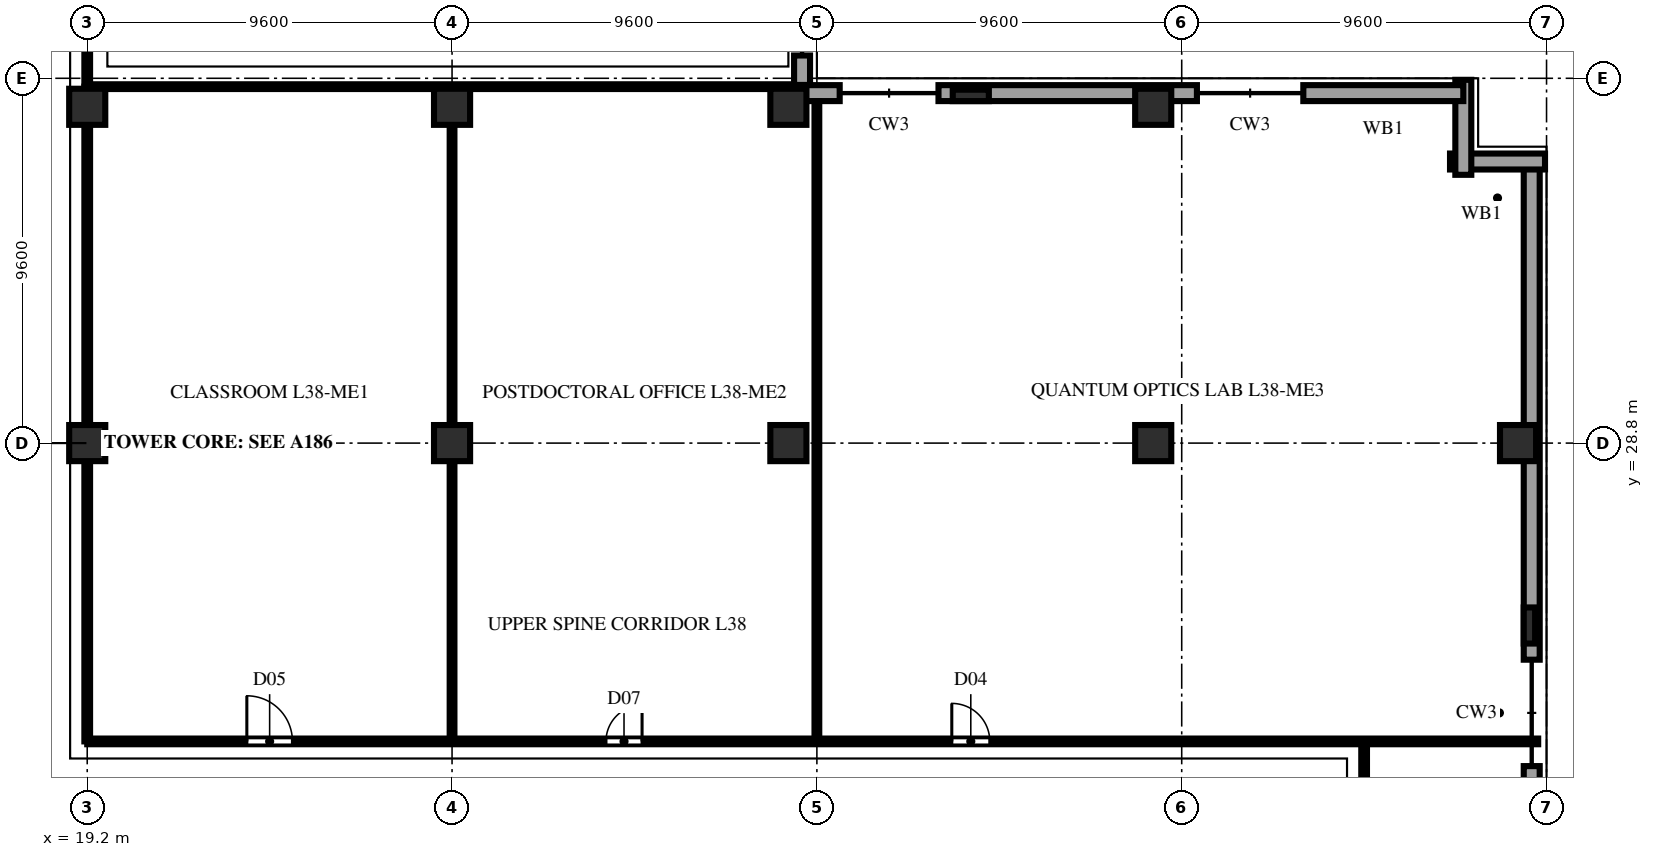
"""IFC4 building model, lengths in metres.
Left out: names, types, materials, properties, quantities, classifications, styles, units other than length and angle.
Written with IfcOpenShell. Run it as: python <this file> out.ifc"""

import sys

from ifc_helpers import new_model, si_unit, direction, frame, frame_2d, origin, origin_2d, place, context, subcontext, project, spatial, rectangle, extrude, element, fill, save


model = new_model("IFC4")
c1 = context("Model", 3, precision=1e-05, world=origin(), true_north=direction((0.0, 1.0)))
c2 = subcontext(c1, "Body", "Model", "MODEL_VIEW")
j1 = project(units=[si_unit("LENGTHUNIT", "METRE"), si_unit("PLANEANGLEUNIT", "RADIAN")], contexts=[c1])
p1 = place(None, origin())
s1 = spatial("IfcSite", under=j1, at=p1, CompositionType="ELEMENT")
p2 = place(p1, origin())
s2 = spatial("IfcBuilding", under=s1, at=p2, CompositionType="ELEMENT")
p3 = place(p2, frame((0.0, 0.0, 150.8)))
s3 = spatial("IfcBuildingStorey", under=s2, at=p3, CompositionType="ELEMENT", Elevation=150.8)
for number, where, z_axis, x_axis in (
    (1, (19.2, 28.8, 0.0), (0.0, 0.0, 1.0), (1.0, 0.0, 0.0)),
    (2, (19.2, 37.65, 0.0), (0.0, 0.0, 1.0), (1.0, 0.0, 0.0)),
    (3, (28.8, 28.8, 0.0), (0.0, 0.0, 1.0), (1.0, 0.0, 0.0)),
    (4, (28.8, 37.65, 0.0), (0.0, 0.0, 1.0), (1.0, 0.0, 0.0)),
    (5, (37.65, 28.8, 0.0), (0.0, 0.0, 1.0), (1.0, 0.0, 0.0)),
    (6, (37.65, 37.65, 0.0), (0.0, 0.0, 1.0), (1.0, 0.0, 0.0)),
    (7, (47.25, 28.8, 0.0), (0.0, 0.0, 1.0), (1.0, 0.0, 0.0)),
    (8, (47.25, 37.65, 0.0), (0.0, 0.0, 1.0), (1.0, 0.0, 0.0)),
    (9, (56.85, 28.8, 0.0), (0.0, 0.0, 1.0), (1.0, 0.0, 0.0)),
):
    element("IfcColumn", number, at=place(p3, frame(where, z_axis=z_axis, x_axis=x_axis)), inside=s3, PredefinedType="COLUMN", context=c2, shape_type="SweptSolid", body=[
        extrude(rectangle(XDim=0.95, YDim=0.95, at=origin_2d()), origin(), (0.0, 0.0, 1.0), 5.2),
    ])
for number, where, z_axis, x_axis in (
    (10, (57.15, 24.0, 0.0), (0.0, 0.0, 1.0), (0.0, 1.0, 0.0)),
    (11, (42.45, 37.95, 0.0), (0.0, 0.0, 1.0), (1.0, 0.0, 0.0)),
):
    element("IfcColumn", number, at=place(p3, frame(where, z_axis=z_axis, x_axis=x_axis)), inside=s3, PredefinedType="PILASTER", context=c2, shape_type="SweptSolid", body=[
        extrude(rectangle(XDim=0.95, YDim=0.3, at=origin_2d()), origin(), (0.0, 0.0, 1.0), 5.2),
    ])
p4 = place(p3, frame((57.21, 13.5, 0.0), z_axis=(0.0, 0.0, 1.0), x_axis=(0.0, 1.0, 0.0)))
e12 = element("IfcWall", 12, at=p4, inside=s3, PredefinedType="SOLIDWALL", context=c2, shape_type="SweptSolid", body=[
    extrude(rectangle(XDim=6.8, YDim=0.42, at=frame_2d((3.4, 0.0))), origin(), (0.0, 0.0, 1.0), 4.94),
])
p5 = place(p3, frame((57.21, 23.1, 0.0), z_axis=(0.0, 0.0, 1.0), x_axis=(0.0, 1.0, 0.0)))
e13 = element("IfcWall", 13, at=p5, inside=s3, PredefinedType="SOLIDWALL", context=c2, shape_type="SweptSolid", body=[
    extrude(rectangle(XDim=13.11, YDim=0.42, at=frame_2d((6.555, 0.0))), origin(), (0.0, 0.0, 1.0), 4.94),
])
for number, where, z_axis, x_axis in (
    (14, (57.56, 36.21, 0.0), (0.0, 0.0, 1.0), (-1.0, 0.0, 0.0)),
    (15, (55.41, 35.86, 0.0), (0.0, 0.0, 1.0), (0.0, 1.0, 0.0)),
):
    element("IfcWall", number, at=place(p3, frame(where, z_axis=z_axis, x_axis=x_axis)), inside=s3, PredefinedType="SOLIDWALL", context=c2, shape_type="SweptSolid", body=[
        extrude(rectangle(XDim=2.5, YDim=0.42, at=frame_2d((1.25, 0.0))), origin(), (0.0, 0.0, 1.0), 4.94),
    ])
p6 = place(p3, frame((55.41, 38.01, 0.0), z_axis=(0.0, 0.0, 1.0), x_axis=(-1.0, 0.0, 0.0)))
e16 = element("IfcWall", 16, at=p6, inside=s3, PredefinedType="SOLIDWALL", context=c2, shape_type="SweptSolid", body=[
    extrude(rectangle(XDim=4.21, YDim=0.42, at=frame_2d((2.105, 0.0))), origin(), (0.0, 0.0, 1.0), 4.94),
])
p7 = place(p3, frame((48.4, 38.01, 0.0), z_axis=(0.0, 0.0, 1.0), x_axis=(-1.0, 0.0, 0.0)))
e17 = element("IfcWall", 17, at=p7, inside=s3, PredefinedType="SOLIDWALL", context=c2, shape_type="SweptSolid", body=[
    extrude(rectangle(XDim=6.8, YDim=0.42, at=frame_2d((3.4, 0.0))), origin(), (0.0, 0.0, 1.0), 4.94),
])
p8 = place(p3, frame((39.0, 38.01, 0.0), z_axis=(0.0, 0.0, 1.0), x_axis=(-1.0, 0.0, 0.0)))
e18 = element("IfcWall", 18, at=p8, inside=s3, PredefinedType="SOLIDWALL", context=c2, shape_type="SweptSolid", body=[
    extrude(rectangle(XDim=1.2, YDim=0.42, at=frame_2d((0.6, 0.0))), origin(), (0.0, 0.0, 1.0), 4.94),
])
p9 = place(p3, frame((38.01, 38.225, 0.0), z_axis=(0.0, 0.0, 1.0), x_axis=(0.0, 1.0, 0.0)))
e19 = element("IfcWall", 19, at=p9, inside=s3, PredefinedType="SOLIDWALL", context=c2, shape_type="SweptSolid", body=[
    extrude(rectangle(XDim=0.775, YDim=0.42, at=frame_2d((0.387, 0.0))), origin(), (0.0, 0.0, 1.0), 4.94),
])
p10 = place(p3, frame((52.8, 18.1, 0.0), z_axis=(0.0, 0.0, 1.0), x_axis=(0.0, 1.0, 0.0)))
e20 = element("IfcWall", 20, at=p10, inside=s3, PredefinedType="PARTITIONING", context=c2, shape_type="SweptSolid", body=[
    extrude(rectangle(XDim=2.85, YDim=0.15, at=frame_2d((1.425, 0.0))), origin(), (0.0, 0.0, 1.0), 4.94),
])
p11 = place(p3, frame((28.8, 20.95, 0.0), z_axis=(0.0, 0.0, 1.0), x_axis=(0.0, 1.0, 0.0)))
e21 = element("IfcWall", 21, at=p11, inside=s3, PredefinedType="PARTITIONING", context=c2, shape_type="SweptSolid", body=[
    extrude(rectangle(XDim=17.23, YDim=0.125, at=frame_2d((8.615, 0.0))), origin(), (0.0, 0.0, 1.0), 4.245),
])
p12 = place(p3, frame((38.4, 20.95, 0.0), z_axis=(0.0, 0.0, 1.0), x_axis=(0.0, 1.0, 0.0)))
e22 = element("IfcWall", 22, at=p12, inside=s3, PredefinedType="PARTITIONING", context=c2, shape_type="SweptSolid", body=[
    extrude(rectangle(XDim=16.84, YDim=0.125, at=frame_2d((8.42, 0.0))), origin(), (0.0, 0.0, 1.0), 4.94),
])
p13 = place(p3, frame((19.2, 20.95, 0.0), z_axis=(0.0, 0.0, 1.0), x_axis=(1.0, 0.0, 0.0)))
e23 = element("IfcWall", 23, at=p13, inside=s3, PredefinedType="PARTITIONING", context=c2, shape_type="SweptSolid", body=[
    extrude(rectangle(XDim=38.18, YDim=0.15, at=frame_2d((19.09, 0.0))), origin(), (0.0, 0.0, 1.0), 4.94),
])
p14 = place(p13, frame((4.2, 0.0, 0.0)))
e24 = element("IfcOpeningElement", 24, at=p14, cuts=e23, PredefinedType="OPENING", context=c2, shape_type="SweptSolid", body=[
    extrude(rectangle(XDim=1.2, YDim=2.2, at=frame_2d((0.6, 1.1))), frame((0.0, 0.087, 0.0), z_axis=(0.0, -1.0, 0.0), x_axis=(1.0, 0.0, 0.0)), (0.0, 0.0, 1.0), 0.174),
])
p15 = place(p13, frame((13.65, 0.0, 0.0)))
e25 = element("IfcOpeningElement", 25, at=p15, cuts=e23, PredefinedType="OPENING", context=c2, shape_type="SweptSolid", body=[
    extrude(rectangle(XDim=0.95, YDim=2.15, at=frame_2d((0.475, 1.075))), frame((0.0, 0.087, 0.0), z_axis=(0.0, -1.0, 0.0), x_axis=(1.0, 0.0, 0.0)), (0.0, 0.0, 1.0), 0.174),
])
p16 = place(p13, frame((22.75, 0.0, 0.0)))
e26 = element("IfcOpeningElement", 26, at=p16, cuts=e23, PredefinedType="OPENING", context=c2, shape_type="SweptSolid", body=[
    extrude(rectangle(XDim=1.0, YDim=2.2, at=frame_2d((0.5, 1.1))), frame((0.0, 0.087, 0.0), z_axis=(0.0, -1.0, 0.0), x_axis=(1.0, 0.0, 0.0)), (0.0, 0.0, 1.0), 0.174),
])
p17 = place(p3, frame((19.2, 20.95, 0.0), z_axis=(0.0, 0.0, 1.0), x_axis=(0.0, 1.0, 0.0)))
e27 = element("IfcWall", 27, at=p17, inside=s3, PredefinedType="PARTITIONING", context=c2, shape_type="SweptSolid", body=[
    extrude(rectangle(XDim=17.23, YDim=0.15, at=frame_2d((8.615, 0.0))), origin(), (0.0, 0.0, 1.0), 4.245),
])
p18 = place(p3, frame((19.28, 38.18, 0.0), z_axis=(0.0, 0.0, 1.0), x_axis=(1.0, 0.0, 0.0)))
e28 = element("IfcWall", 28, at=p18, inside=s3, PredefinedType="PARTITIONING", context=c2, shape_type="SweptSolid", body=[
    extrude(rectangle(XDim=18.37, YDim=0.125, at=frame_2d((9.185, 0.0))), origin(), (0.0, 0.0, 1.0), 4.94),
])
p19 = place(p3, frame((19.2, 38.18, 0.0), z_axis=(0.0, 0.0, 1.0), x_axis=(0.0, 1.0, 0.0)))
e29 = element("IfcWall", 29, at=p19, inside=s3, PredefinedType="PARTITIONING", context=c2, shape_type="SweptSolid", body=[
    extrude(rectangle(XDim=10.07, YDim=0.15, at=frame_2d((5.035, 0.0))), origin(), (0.0, 0.0, 1.0), 4.245),
])
p20 = place(p19, frame((3.6, 0.0, 0.0)))
e30 = element("IfcOpeningElement", 30, at=p20, cuts=e29, PredefinedType="OPENING", context=c2, shape_type="SweptSolid", body=[
    extrude(rectangle(XDim=1.2, YDim=2.2, at=frame_2d((0.6, 1.1))), frame((0.0, 0.087, 0.0), z_axis=(0.0, -1.0, 0.0), x_axis=(1.0, 0.0, 0.0)), (0.0, 0.0, 1.0), 0.174),
])
p21 = place(p14, origin())
e31 = element("IfcDoor", 31, at=p21, inside=s3, OperationType="SINGLE_SWING_LEFT", PredefinedType="DOOR", context=c2, shape_type="SweptSolid", body=[
    extrude(rectangle(XDim=1.2, YDim=2.2, at=frame_2d((0.6, 1.1))), frame((0.0, 0.025, 0.0), z_axis=(0.0, -1.0, 0.0), x_axis=(1.0, 0.0, 0.0)), (0.0, 0.0, 1.0), 0.05),
])
fill(e24, e31)
p22 = place(p15, origin())
e32 = element("IfcDoor", 32, at=p22, inside=s3, OperationType="SINGLE_SWING_RIGHT", PredefinedType="DOOR", context=c2, shape_type="SweptSolid", body=[
    extrude(rectangle(XDim=0.95, YDim=2.15, at=frame_2d((0.475, 1.075))), frame((0.0, 0.025, 0.0), z_axis=(0.0, -1.0, 0.0), x_axis=(1.0, 0.0, 0.0)), (0.0, 0.0, 1.0), 0.05),
])
fill(e25, e32)
p23 = place(p16, origin())
e33 = element("IfcDoor", 33, at=p23, inside=s3, OperationType="SINGLE_SWING_LEFT", PredefinedType="DOOR", context=c2, shape_type="SweptSolid", body=[
    extrude(rectangle(XDim=1.0, YDim=2.2, at=frame_2d((0.5, 1.1))), frame((0.0, 0.025, 0.0), z_axis=(0.0, -1.0, 0.0), x_axis=(1.0, 0.0, 0.0)), (0.0, 0.0, 1.0), 0.05),
])
fill(e26, e33)
save(model, sys.argv[1])
